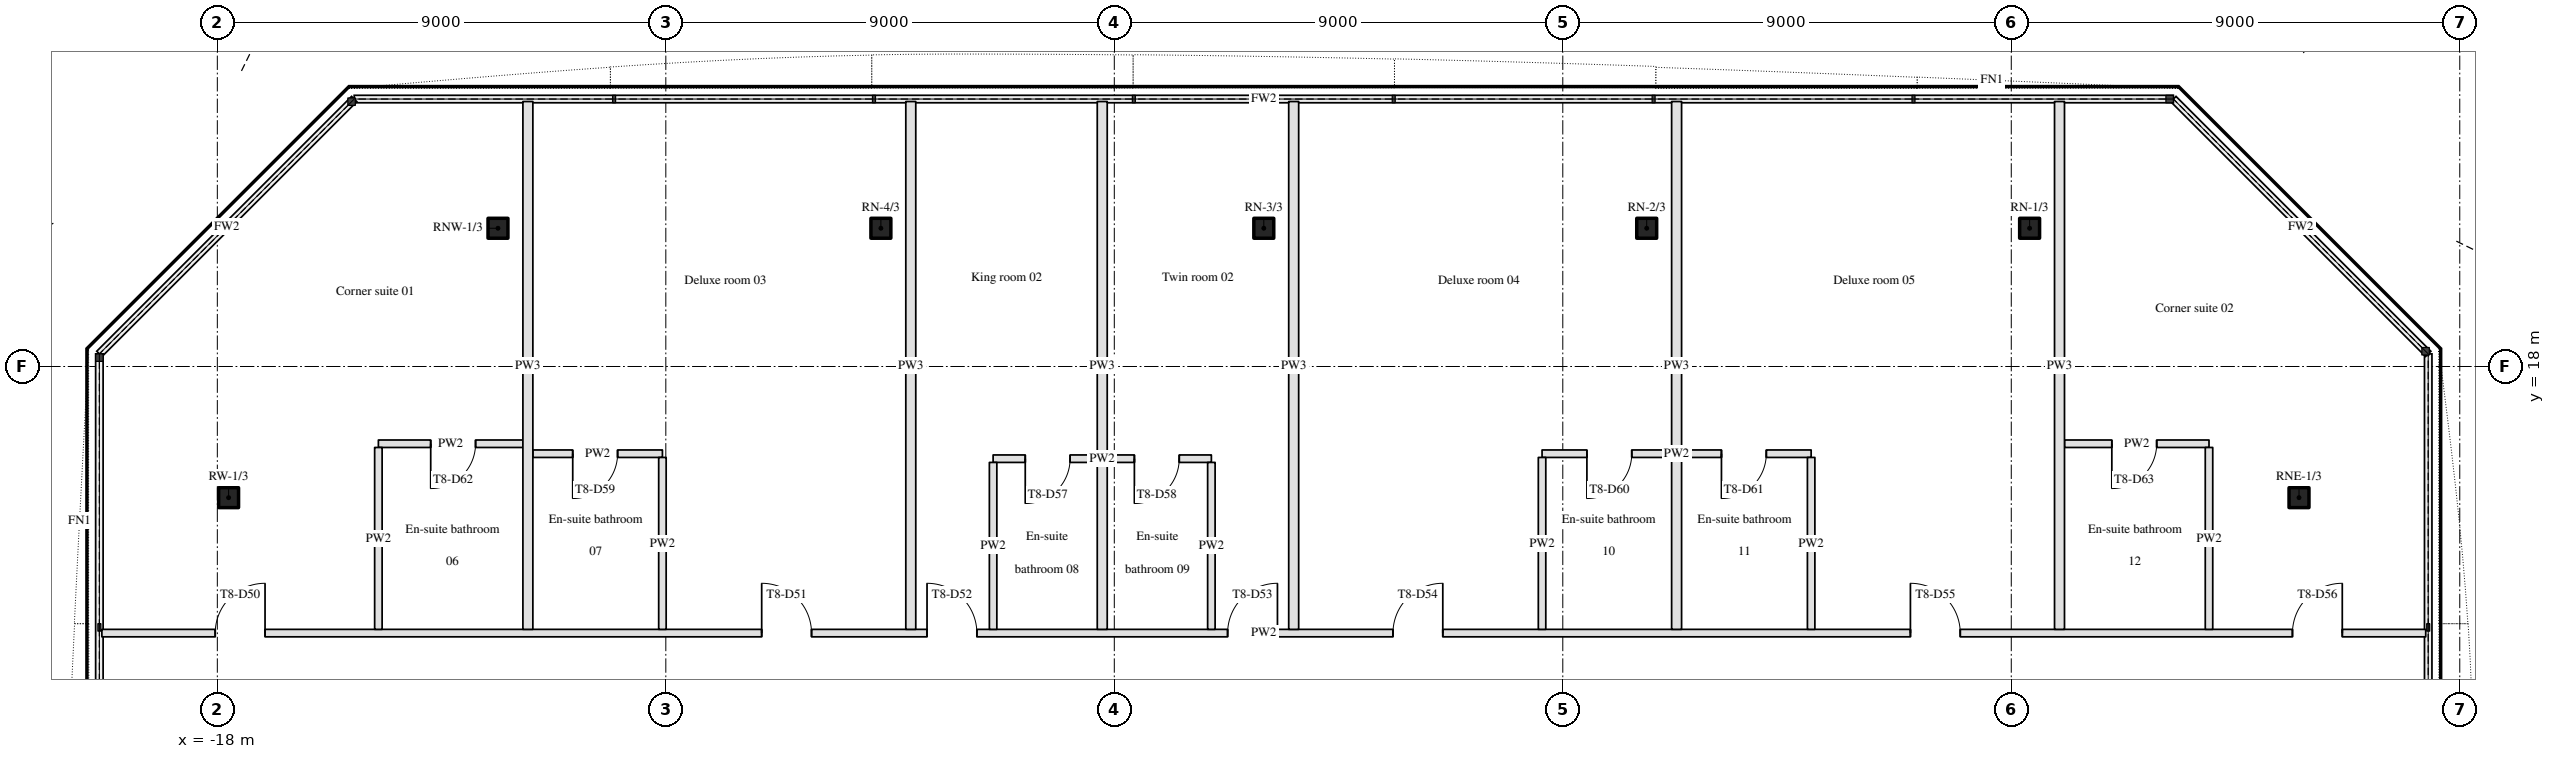
"""IFC4 building model, lengths in metres.
Left out: names, types, materials, properties, quantities, classifications, styles, units other than length and angle.
Written with IfcOpenShell. Run it as: python <this file> out.ifc"""

import sys

from ifc_helpers import new_model, si_unit, direction, frame, frame_2d, origin, origin_2d, place, context, subcontext, project, spatial, rectangle, hollow_rectangle, extrude, element, fill, save


model = new_model("IFC4")
c1 = context("Model", 3, precision=1e-05, world=origin(), true_north=direction((0.0, 1.0)))
c2 = subcontext(c1, "Body", "Model", "MODEL_VIEW")
j1 = project(units=[si_unit("LENGTHUNIT", "METRE"), si_unit("PLANEANGLEUNIT", "RADIAN")], contexts=[c1])
p1 = place(None, origin())
s1 = spatial("IfcSite", under=j1, at=p1, CompositionType="ELEMENT")
p2 = place(p1, origin())
s2 = spatial("IfcBuilding", under=s1, at=p2, CompositionType="ELEMENT")
p3 = place(p2, frame((0.0, 0.0, 121.5)))
s3 = spatial("IfcBuildingStorey", under=s2, at=p3, CompositionType="ELEMENT", Elevation=121.5)
for number, where, z_axis, x_axis in (
    (1, (23.774, 15.368, 0.0), (0.0, 0.0, 1.0), (1.0, 0.0, 0.0)),
    (2, (18.368, 20.774, 0.0), (0.0, 0.0, 1.0), (1.0, 0.0, 0.0)),
    (3, (10.684, 20.774, 0.0), (0.0, 0.0, 1.0), (1.0, 0.0, 0.0)),
    (4, (3.0, 20.774, 0.0), (0.0, 0.0, 1.0), (1.0, 0.0, 0.0)),
    (5, (-4.684, 20.774, 0.0), (0.0, 0.0, 1.0), (1.0, 0.0, 0.0)),
    (6, (-12.368, 20.774, 0.0), (0.0, 0.0, 1.0), (1.0, 0.0, 0.0)),
    (7, (-17.774, 15.368, 0.0), (0.0, 0.0, 1.0), (1.0, 0.0, 0.0)),
):
    element("IfcColumn", number, at=place(p3, frame(where, z_axis=z_axis, x_axis=x_axis)), inside=s3, PredefinedType="COLUMN", context=c2, shape_type="SweptSolid", body=[
        extrude(hollow_rectangle(XDim=0.4, YDim=0.4, WallThickness=0.02, InnerFilletRadius=0.03, OuterFilletRadius=0.05, at=origin_2d()), origin(), (0.0, 0.0, 1.0), 3.4),
    ])
p4 = place(p3, frame((-20.317, 12.65, 0.0), z_axis=(0.0, 0.0, 1.0), x_axis=(1.0, 0.0, 0.0)))
e8 = element("IfcWall", 8, at=p4, inside=s3, PredefinedType="PARTITIONING", context=c2, shape_type="SweptSolid", body=[
    extrude(rectangle(XDim=46.634, YDim=0.15, at=frame_2d((23.317, 0.0))), origin(), (0.0, 0.0, 1.0), 2.46),
])
p5 = place(p4, frame((2.274, 0.0, 0.0)))
e9 = element("IfcOpeningElement", 9, at=p5, cuts=e8, PredefinedType="OPENING", context=c2, shape_type="SweptSolid", body=[
    extrude(rectangle(XDim=1.0, YDim=2.1, at=frame_2d((0.5, 1.05))), frame((0.0, 0.085, 0.0), z_axis=(0.0, -1.0, 0.0), x_axis=(1.0, 0.0, 0.0)), (0.0, 0.0, 1.0), 0.17),
])
p6 = place(p4, frame((13.241, 0.0, 0.0)))
e10 = element("IfcOpeningElement", 10, at=p6, cuts=e8, PredefinedType="OPENING", context=c2, shape_type="SweptSolid", body=[
    extrude(rectangle(XDim=1.0, YDim=2.1, at=frame_2d((0.5, 1.05))), frame((0.0, 0.085, 0.0), z_axis=(0.0, -1.0, 0.0), x_axis=(1.0, 0.0, 0.0)), (0.0, 0.0, 1.0), 0.17),
])
p7 = place(p4, frame((16.559, 0.0, 0.0)))
e11 = element("IfcOpeningElement", 11, at=p7, cuts=e8, PredefinedType="OPENING", context=c2, shape_type="SweptSolid", body=[
    extrude(rectangle(XDim=1.0, YDim=2.1, at=frame_2d((0.5, 1.05))), frame((0.0, 0.085, 0.0), z_axis=(0.0, -1.0, 0.0), x_axis=(1.0, 0.0, 0.0)), (0.0, 0.0, 1.0), 0.17),
])
p8 = place(p4, frame((22.591, 0.0, 0.0)))
e12 = element("IfcOpeningElement", 12, at=p8, cuts=e8, PredefinedType="OPENING", context=c2, shape_type="SweptSolid", body=[
    extrude(rectangle(XDim=1.0, YDim=2.1, at=frame_2d((0.5, 1.05))), frame((0.0, 0.085, 0.0), z_axis=(0.0, -1.0, 0.0), x_axis=(1.0, 0.0, 0.0)), (0.0, 0.0, 1.0), 0.17),
])
p9 = place(p4, frame((25.909, 0.0, 0.0)))
e13 = element("IfcOpeningElement", 13, at=p9, cuts=e8, PredefinedType="OPENING", context=c2, shape_type="SweptSolid", body=[
    extrude(rectangle(XDim=1.0, YDim=2.1, at=frame_2d((0.5, 1.05))), frame((0.0, 0.085, 0.0), z_axis=(0.0, -1.0, 0.0), x_axis=(1.0, 0.0, 0.0)), (0.0, 0.0, 1.0), 0.17),
])
p10 = place(p4, frame((36.293, 0.0, 0.0)))
e14 = element("IfcOpeningElement", 14, at=p10, cuts=e8, PredefinedType="OPENING", context=c2, shape_type="SweptSolid", body=[
    extrude(rectangle(XDim=1.0, YDim=2.1, at=frame_2d((0.5, 1.05))), frame((0.0, 0.085, 0.0), z_axis=(0.0, -1.0, 0.0), x_axis=(1.0, 0.0, 0.0)), (0.0, 0.0, 1.0), 0.17),
])
p11 = place(p4, frame((43.959, 0.0, 0.0)))
e15 = element("IfcOpeningElement", 15, at=p11, cuts=e8, PredefinedType="OPENING", context=c2, shape_type="SweptSolid", body=[
    extrude(rectangle(XDim=1.0, YDim=2.1, at=frame_2d((0.5, 1.05))), frame((0.0, 0.085, 0.0), z_axis=(0.0, -1.0, 0.0), x_axis=(1.0, 0.0, 0.0)), (0.0, 0.0, 1.0), 0.17),
])
p12 = place(p3, frame((1.948, 16.15, 0.0), z_axis=(0.0, 0.0, 1.0), x_axis=(-1.0, 0.0, 0.0)))
e16 = element("IfcWall", 16, at=p12, inside=s3, PredefinedType="PARTITIONING", context=c2, shape_type="SweptSolid", body=[
    extrude(rectangle(XDim=4.38, YDim=0.15, at=frame_2d((2.19, 0.0))), origin(), (0.0, 0.0, 1.0), 2.46),
])
p13 = place(p12, frame((2.835, 0.0, 0.0)))
e17 = element("IfcOpeningElement", 17, at=p13, cuts=e16, PredefinedType="OPENING", context=c2, shape_type="SweptSolid", body=[
    extrude(rectangle(XDim=0.9, YDim=2.1, at=frame_2d((0.45, 1.05))), frame((0.0, 0.085, 0.0), z_axis=(0.0, -1.0, 0.0), x_axis=(1.0, 0.0, 0.0)), (0.0, 0.0, 1.0), 0.17),
])
p14 = place(p12, frame((0.645, 0.0, 0.0)))
e18 = element("IfcOpeningElement", 18, at=p14, cuts=e16, PredefinedType="OPENING", context=c2, shape_type="SweptSolid", body=[
    extrude(rectangle(XDim=0.9, YDim=2.1, at=frame_2d((0.45, 1.05))), frame((0.0, 0.085, 0.0), z_axis=(0.0, -1.0, 0.0), x_axis=(1.0, 0.0, 0.0)), (0.0, 0.0, 1.0), 0.17),
])
p15 = place(p3, frame((-9.068, 16.25, 0.0), z_axis=(0.0, 0.0, 1.0), x_axis=(-1.0, 0.0, 0.0)))
e19 = element("IfcWall", 19, at=p15, inside=s3, PredefinedType="PARTITIONING", context=c2, shape_type="SweptSolid", body=[
    extrude(rectangle(XDim=2.6, YDim=0.15, at=frame_2d((1.3, 0.0))), origin(), (0.0, 0.0, 1.0), 2.46),
])
p16 = place(p15, frame((0.9, 0.0, 0.0)))
e20 = element("IfcOpeningElement", 20, at=p16, cuts=e19, PredefinedType="OPENING", context=c2, shape_type="SweptSolid", body=[
    extrude(rectangle(XDim=0.9, YDim=2.1, at=frame_2d((0.45, 1.05))), frame((0.0, 0.085, 0.0), z_axis=(0.0, -1.0, 0.0), x_axis=(1.0, 0.0, 0.0)), (0.0, 0.0, 1.0), 0.17),
])
p17 = place(p3, frame((13.984, 16.25, 0.0), z_axis=(0.0, 0.0, 1.0), x_axis=(-1.0, 0.0, 0.0)))
e21 = element("IfcWall", 21, at=p17, inside=s3, PredefinedType="PARTITIONING", context=c2, shape_type="SweptSolid", body=[
    extrude(rectangle(XDim=5.4, YDim=0.15, at=frame_2d((2.7, 0.0))), origin(), (0.0, 0.0, 1.0), 2.46),
])
p18 = place(p17, frame((3.6, 0.0, 0.0)))
e22 = element("IfcOpeningElement", 22, at=p18, cuts=e21, PredefinedType="OPENING", context=c2, shape_type="SweptSolid", body=[
    extrude(rectangle(XDim=0.9, YDim=2.1, at=frame_2d((0.45, 1.05))), frame((0.0, 0.085, 0.0), z_axis=(0.0, -1.0, 0.0), x_axis=(1.0, 0.0, 0.0)), (0.0, 0.0, 1.0), 0.17),
])
p19 = place(p17, frame((0.9, 0.0, 0.0)))
e23 = element("IfcOpeningElement", 23, at=p19, cuts=e21, PredefinedType="OPENING", context=c2, shape_type="SweptSolid", body=[
    extrude(rectangle(XDim=0.9, YDim=2.1, at=frame_2d((0.45, 1.05))), frame((0.0, 0.085, 0.0), z_axis=(0.0, -1.0, 0.0), x_axis=(1.0, 0.0, 0.0)), (0.0, 0.0, 1.0), 0.17),
])
p20 = place(p3, frame((-11.868, 16.45, 0.0), z_axis=(0.0, 0.0, 1.0), x_axis=(-1.0, 0.0, 0.0)))
e24 = element("IfcWall", 24, at=p20, inside=s3, PredefinedType="PARTITIONING", context=c2, shape_type="SweptSolid", body=[
    extrude(rectangle(XDim=2.9, YDim=0.15, at=frame_2d((1.45, 0.0))), origin(), (0.0, 0.0, 1.0), 2.46),
])
p21 = place(p20, frame((0.95, 0.0, 0.0)))
e25 = element("IfcOpeningElement", 25, at=p21, cuts=e24, PredefinedType="OPENING", context=c2, shape_type="SweptSolid", body=[
    extrude(rectangle(XDim=0.9, YDim=2.1, at=frame_2d((0.45, 1.05))), frame((0.0, 0.085, 0.0), z_axis=(0.0, -1.0, 0.0), x_axis=(1.0, 0.0, 0.0)), (0.0, 0.0, 1.0), 0.17),
])
p22 = place(p3, frame((21.968, 16.45, 0.0), z_axis=(0.0, 0.0, 1.0), x_axis=(-1.0, 0.0, 0.0)))
e26 = element("IfcWall", 26, at=p22, inside=s3, PredefinedType="PARTITIONING", context=c2, shape_type="SweptSolid", body=[
    extrude(rectangle(XDim=2.9, YDim=0.15, at=frame_2d((1.45, 0.0))), origin(), (0.0, 0.0, 1.0), 2.46),
])
p23 = place(p22, frame((1.05, 0.0, 0.0)))
e27 = element("IfcOpeningElement", 27, at=p23, cuts=e26, PredefinedType="OPENING", context=c2, shape_type="SweptSolid", body=[
    extrude(rectangle(XDim=0.9, YDim=2.1, at=frame_2d((0.45, 1.05))), frame((0.0, 0.085, 0.0), z_axis=(0.0, -1.0, 0.0), x_axis=(1.0, 0.0, 0.0)), (0.0, 0.0, 1.0), 0.17),
])
p24 = place(p3, frame((-14.768, 12.725, 0.0), z_axis=(0.0, 0.0, 1.0), x_axis=(0.0, 1.0, 0.0)))
e28 = element("IfcWall", 28, at=p24, inside=s3, PredefinedType="PARTITIONING", context=c2, shape_type="SweptSolid", body=[
    extrude(rectangle(XDim=3.65, YDim=0.15, at=frame_2d((1.825, 0.0))), origin(), (0.0, 0.0, 1.0), 2.46),
])
p25 = place(p3, frame((-11.768, 12.725, 0.0), z_axis=(0.0, 0.0, 1.0), x_axis=(0.0, 1.0, 0.0)))
e29 = element("IfcWall", 29, at=p25, inside=s3, PredefinedType="PARTITIONING", context=c2, shape_type="SweptSolid", body=[
    extrude(rectangle(XDim=10.592, YDim=0.2, at=frame_2d((5.296, 0.0))), origin(), (0.0, 0.0, 1.0), 2.46),
])
p26 = place(p3, frame((-9.068, 12.725, 0.0), z_axis=(0.0, 0.0, 1.0), x_axis=(0.0, 1.0, 0.0)))
e30 = element("IfcWall", 30, at=p26, inside=s3, PredefinedType="PARTITIONING", context=c2, shape_type="SweptSolid", body=[
    extrude(rectangle(XDim=3.45, YDim=0.15, at=frame_2d((1.725, 0.0))), origin(), (0.0, 0.0, 1.0), 2.46),
])
p27 = place(p3, frame((-4.084, 12.725, 0.0), z_axis=(0.0, 0.0, 1.0), x_axis=(0.0, 1.0, 0.0)))
e31 = element("IfcWall", 31, at=p27, inside=s3, PredefinedType="PARTITIONING", context=c2, shape_type="SweptSolid", body=[
    extrude(rectangle(XDim=10.592, YDim=0.2, at=frame_2d((5.296, 0.0))), origin(), (0.0, 0.0, 1.0), 2.46),
])
p28 = place(p3, frame((-2.432, 12.725, 0.0), z_axis=(0.0, 0.0, 1.0), x_axis=(0.0, 1.0, 0.0)))
e32 = element("IfcWall", 32, at=p28, inside=s3, PredefinedType="PARTITIONING", context=c2, shape_type="SweptSolid", body=[
    extrude(rectangle(XDim=3.35, YDim=0.15, at=frame_2d((1.675, 0.0))), origin(), (0.0, 0.0, 1.0), 2.46),
])
p29 = place(p3, frame((-0.242, 12.725, 0.0), z_axis=(0.0, 0.0, 1.0), x_axis=(0.0, 1.0, 0.0)))
e33 = element("IfcWall", 33, at=p29, inside=s3, PredefinedType="PARTITIONING", context=c2, shape_type="SweptSolid", body=[
    extrude(rectangle(XDim=10.592, YDim=0.2, at=frame_2d((5.296, 0.0))), origin(), (0.0, 0.0, 1.0), 2.46),
])
p30 = place(p3, frame((1.948, 12.725, 0.0), z_axis=(0.0, 0.0, 1.0), x_axis=(0.0, 1.0, 0.0)))
e34 = element("IfcWall", 34, at=p30, inside=s3, PredefinedType="PARTITIONING", context=c2, shape_type="SweptSolid", body=[
    extrude(rectangle(XDim=3.35, YDim=0.15, at=frame_2d((1.675, 0.0))), origin(), (0.0, 0.0, 1.0), 2.46),
])
p31 = place(p3, frame((3.6, 12.725, 0.0), z_axis=(0.0, 0.0, 1.0), x_axis=(0.0, 1.0, 0.0)))
e35 = element("IfcWall", 35, at=p31, inside=s3, PredefinedType="PARTITIONING", context=c2, shape_type="SweptSolid", body=[
    extrude(rectangle(XDim=10.592, YDim=0.2, at=frame_2d((5.296, 0.0))), origin(), (0.0, 0.0, 1.0), 2.46),
])
p32 = place(p3, frame((8.584, 12.725, 0.0), z_axis=(0.0, 0.0, 1.0), x_axis=(0.0, 1.0, 0.0)))
e36 = element("IfcWall", 36, at=p32, inside=s3, PredefinedType="PARTITIONING", context=c2, shape_type="SweptSolid", body=[
    extrude(rectangle(XDim=3.45, YDim=0.15, at=frame_2d((1.725, 0.0))), origin(), (0.0, 0.0, 1.0), 2.46),
])
p33 = place(p3, frame((11.284, 12.725, 0.0), z_axis=(0.0, 0.0, 1.0), x_axis=(0.0, 1.0, 0.0)))
e37 = element("IfcWall", 37, at=p33, inside=s3, PredefinedType="PARTITIONING", context=c2, shape_type="SweptSolid", body=[
    extrude(rectangle(XDim=10.592, YDim=0.2, at=frame_2d((5.296, 0.0))), origin(), (0.0, 0.0, 1.0), 2.46),
])
p34 = place(p3, frame((13.984, 12.725, 0.0), z_axis=(0.0, 0.0, 1.0), x_axis=(0.0, 1.0, 0.0)))
e38 = element("IfcWall", 38, at=p34, inside=s3, PredefinedType="PARTITIONING", context=c2, shape_type="SweptSolid", body=[
    extrude(rectangle(XDim=3.45, YDim=0.15, at=frame_2d((1.725, 0.0))), origin(), (0.0, 0.0, 1.0), 2.46),
])
p35 = place(p3, frame((18.968, 12.725, 0.0), z_axis=(0.0, 0.0, 1.0), x_axis=(0.0, 1.0, 0.0)))
e39 = element("IfcWall", 39, at=p35, inside=s3, PredefinedType="PARTITIONING", context=c2, shape_type="SweptSolid", body=[
    extrude(rectangle(XDim=10.592, YDim=0.2, at=frame_2d((5.296, 0.0))), origin(), (0.0, 0.0, 1.0), 2.46),
])
p36 = place(p3, frame((21.968, 12.725, 0.0), z_axis=(0.0, 0.0, 1.0), x_axis=(0.0, 1.0, 0.0)))
e40 = element("IfcWall", 40, at=p36, inside=s3, PredefinedType="PARTITIONING", context=c2, shape_type="SweptSolid", body=[
    extrude(rectangle(XDim=3.65, YDim=0.15, at=frame_2d((1.825, 0.0))), origin(), (0.0, 0.0, 1.0), 2.46),
])
p37 = place(p5, origin())
e41 = element("IfcDoor", 41, at=p37, inside=s3, OperationType="SINGLE_SWING_RIGHT", PredefinedType="DOOR", context=c2, shape_type="SweptSolid", body=[
    extrude(rectangle(XDim=1.0, YDim=2.1, at=frame_2d((0.5, 1.05))), frame((0.0, 0.025, 0.0), z_axis=(0.0, -1.0, 0.0), x_axis=(1.0, 0.0, 0.0)), (0.0, 0.0, 1.0), 0.05),
])
fill(e9, e41)
p38 = place(p6, origin())
e42 = element("IfcDoor", 42, at=p38, inside=s3, OperationType="SINGLE_SWING_LEFT", PredefinedType="DOOR", context=c2, shape_type="SweptSolid", body=[
    extrude(rectangle(XDim=1.0, YDim=2.1, at=frame_2d((0.5, 1.05))), frame((0.0, 0.025, 0.0), z_axis=(0.0, -1.0, 0.0), x_axis=(1.0, 0.0, 0.0)), (0.0, 0.0, 1.0), 0.05),
])
fill(e10, e42)
p39 = place(p7, origin())
e43 = element("IfcDoor", 43, at=p39, inside=s3, OperationType="SINGLE_SWING_LEFT", PredefinedType="DOOR", context=c2, shape_type="SweptSolid", body=[
    extrude(rectangle(XDim=1.0, YDim=2.1, at=frame_2d((0.5, 1.05))), frame((0.0, 0.025, 0.0), z_axis=(0.0, -1.0, 0.0), x_axis=(1.0, 0.0, 0.0)), (0.0, 0.0, 1.0), 0.05),
])
fill(e11, e43)
p40 = place(p8, origin())
e44 = element("IfcDoor", 44, at=p40, inside=s3, OperationType="SINGLE_SWING_RIGHT", PredefinedType="DOOR", context=c2, shape_type="SweptSolid", body=[
    extrude(rectangle(XDim=1.0, YDim=2.1, at=frame_2d((0.5, 1.05))), frame((0.0, 0.025, 0.0), z_axis=(0.0, -1.0, 0.0), x_axis=(1.0, 0.0, 0.0)), (0.0, 0.0, 1.0), 0.05),
])
fill(e12, e44)
p41 = place(p9, origin())
e45 = element("IfcDoor", 45, at=p41, inside=s3, OperationType="SINGLE_SWING_RIGHT", PredefinedType="DOOR", context=c2, shape_type="SweptSolid", body=[
    extrude(rectangle(XDim=1.0, YDim=2.1, at=frame_2d((0.5, 1.05))), frame((0.0, 0.025, 0.0), z_axis=(0.0, -1.0, 0.0), x_axis=(1.0, 0.0, 0.0)), (0.0, 0.0, 1.0), 0.05),
])
fill(e13, e45)
p42 = place(p10, origin())
e46 = element("IfcDoor", 46, at=p42, inside=s3, OperationType="SINGLE_SWING_LEFT", PredefinedType="DOOR", context=c2, shape_type="SweptSolid", body=[
    extrude(rectangle(XDim=1.0, YDim=2.1, at=frame_2d((0.5, 1.05))), frame((0.0, 0.025, 0.0), z_axis=(0.0, -1.0, 0.0), x_axis=(1.0, 0.0, 0.0)), (0.0, 0.0, 1.0), 0.05),
])
fill(e14, e46)
p43 = place(p11, origin())
e47 = element("IfcDoor", 47, at=p43, inside=s3, OperationType="SINGLE_SWING_RIGHT", PredefinedType="DOOR", context=c2, shape_type="SweptSolid", body=[
    extrude(rectangle(XDim=1.0, YDim=2.1, at=frame_2d((0.5, 1.05))), frame((0.0, 0.025, 0.0), z_axis=(0.0, -1.0, 0.0), x_axis=(1.0, 0.0, 0.0)), (0.0, 0.0, 1.0), 0.05),
])
fill(e15, e47)
p44 = place(p21, origin())
e48 = element("IfcDoor", 48, at=p44, inside=s3, OperationType="SINGLE_SWING_RIGHT", PredefinedType="DOOR", context=c2, shape_type="SweptSolid", body=[
    extrude(rectangle(XDim=0.9, YDim=2.1, at=frame_2d((0.45, 1.05))), frame((0.0, 0.025, 0.0), z_axis=(0.0, -1.0, 0.0), x_axis=(1.0, 0.0, 0.0)), (0.0, 0.0, 1.0), 0.05),
])
fill(e25, e48)
p45 = place(p16, origin())
e49 = element("IfcDoor", 49, at=p45, inside=s3, OperationType="SINGLE_SWING_RIGHT", PredefinedType="DOOR", context=c2, shape_type="SweptSolid", body=[
    extrude(rectangle(XDim=0.9, YDim=2.1, at=frame_2d((0.45, 1.05))), frame((0.0, 0.025, 0.0), z_axis=(0.0, -1.0, 0.0), x_axis=(1.0, 0.0, 0.0)), (0.0, 0.0, 1.0), 0.05),
])
fill(e20, e49)
p46 = place(p13, origin())
e50 = element("IfcDoor", 50, at=p46, inside=s3, OperationType="SINGLE_SWING_RIGHT", PredefinedType="DOOR", context=c2, shape_type="SweptSolid", body=[
    extrude(rectangle(XDim=0.9, YDim=2.1, at=frame_2d((0.45, 1.05))), frame((0.0, 0.025, 0.0), z_axis=(0.0, -1.0, 0.0), x_axis=(1.0, 0.0, 0.0)), (0.0, 0.0, 1.0), 0.05),
])
fill(e17, e50)
p47 = place(p14, origin())
e51 = element("IfcDoor", 51, at=p47, inside=s3, OperationType="SINGLE_SWING_RIGHT", PredefinedType="DOOR", context=c2, shape_type="SweptSolid", body=[
    extrude(rectangle(XDim=0.9, YDim=2.1, at=frame_2d((0.45, 1.05))), frame((0.0, 0.025, 0.0), z_axis=(0.0, -1.0, 0.0), x_axis=(1.0, 0.0, 0.0)), (0.0, 0.0, 1.0), 0.05),
])
fill(e18, e51)
p48 = place(p18, origin())
e52 = element("IfcDoor", 52, at=p48, inside=s3, OperationType="SINGLE_SWING_RIGHT", PredefinedType="DOOR", context=c2, shape_type="SweptSolid", body=[
    extrude(rectangle(XDim=0.9, YDim=2.1, at=frame_2d((0.45, 1.05))), frame((0.0, 0.025, 0.0), z_axis=(0.0, -1.0, 0.0), x_axis=(1.0, 0.0, 0.0)), (0.0, 0.0, 1.0), 0.05),
])
fill(e22, e52)
p49 = place(p19, origin())
e53 = element("IfcDoor", 53, at=p49, inside=s3, OperationType="SINGLE_SWING_RIGHT", PredefinedType="DOOR", context=c2, shape_type="SweptSolid", body=[
    extrude(rectangle(XDim=0.9, YDim=2.1, at=frame_2d((0.45, 1.05))), frame((0.0, 0.025, 0.0), z_axis=(0.0, -1.0, 0.0), x_axis=(1.0, 0.0, 0.0)), (0.0, 0.0, 1.0), 0.05),
])
fill(e23, e53)
p50 = place(p23, origin())
e54 = element("IfcDoor", 54, at=p50, inside=s3, OperationType="SINGLE_SWING_RIGHT", PredefinedType="DOOR", context=c2, shape_type="SweptSolid", body=[
    extrude(rectangle(XDim=0.9, YDim=2.1, at=frame_2d((0.45, 1.05))), frame((0.0, 0.025, 0.0), z_axis=(0.0, -1.0, 0.0), x_axis=(1.0, 0.0, 0.0)), (0.0, 0.0, 1.0), 0.05),
])
fill(e27, e54)
save(model, sys.argv[1])
